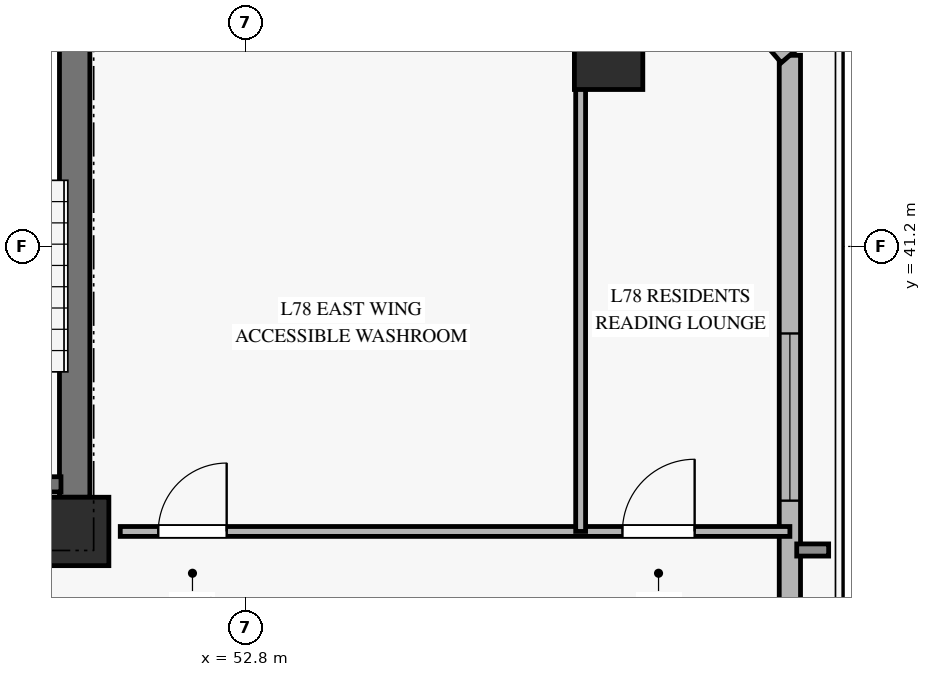
"""IFC4 building model, lengths in metres.
Left out: names, types, materials, properties, quantities, classifications, styles, units other than length and angle.
Written with IfcOpenShell. Run it as: python <this file> out.ifc"""

import sys

from ifc_helpers import new_model, si_unit, direction, frame, frame_2d, origin, origin_2d, place, context, subcontext, project, spatial, rectangle, hollow_rectangle, extrude, source, transform, mapped, element, fill, save


model = new_model("IFC4")
c1 = context("Model", 3, precision=1e-05, world=origin(), true_north=direction((0.0, 1.0)))
c2 = subcontext(c1, "Body", "Model", "MODEL_VIEW")
j1 = project(units=[si_unit("LENGTHUNIT", "METRE"), si_unit("PLANEANGLEUNIT", "RADIAN")], contexts=[c1])
p1 = place(None, origin())
s1 = spatial("IfcSite", under=j1, at=p1, CompositionType="ELEMENT")
p2 = place(p1, origin())
s2 = spatial("IfcBuilding", under=s1, at=p2, CompositionType="ELEMENT")
p3 = place(p2, frame((0.0, 0.0, 304.0)))
s3 = spatial("IfcBuildingStorey", under=s2, at=p3, CompositionType="ELEMENT", Elevation=304.0)
m1 = source(origin(), c2, "Body", "SweptSolid", [
    extrude(rectangle(XDim=0.9, YDim=0.9, at=origin_2d()), origin(), (0.0, 0.0, 1.0), 3.185),
])
p4 = place(p3, frame((50.55, 37.45, 0.0), z_axis=(0.0, 0.0, 1.0), x_axis=(1.0, 0.0, 0.0)))
e1 = element("IfcColumn", 1, at=p4, inside=s3, PredefinedType="PILASTER", context=c2, shape_type="MappedRepresentation", body=[
    mapped(m1, transform((0.0, 0.0, 0.0), x_axis=(1.0, 0.0, 0.0), y_axis=(0.0, 1.0, 0.0), z_axis=(0.0, 0.0, 1.0), scale=1.0)),
])
p5 = place(p3, frame((50.55, 37.9, 0.0), z_axis=(0.0, 0.0, 1.0), x_axis=(0.0, 1.0, 0.0)))
e2 = element("IfcWall", 2, at=p5, inside=s3, PredefinedType="SHEAR", context=c2, shape_type="SweptSolid", body=[
    extrude(rectangle(XDim=8.2, YDim=0.4, at=frame_2d((4.1, 0.0))), origin(), (0.0, 0.0, 1.0), 3.185),
])
m2 = source(origin(), c2, "Body", "SweptSolid", [
    extrude(hollow_rectangle(XDim=0.9, YDim=0.9, WallThickness=0.04, at=origin_2d()), origin(), (0.0, 0.0, 1.0), 3.185),
])
p6 = place(p3, frame((57.575, 43.715, 0.0), z_axis=(0.0, 0.0, 1.0), x_axis=(1.0, 0.0, 0.0)))
e3 = element("IfcColumn", 3, at=p6, inside=s3, PredefinedType="COLUMN", context=c2, shape_type="MappedRepresentation", body=[
    mapped(m2, transform((0.0, 0.0, 0.0), x_axis=(1.0, 0.0, 0.0), y_axis=(0.0, 1.0, 0.0), z_axis=(0.0, 0.0, 1.0), scale=1.0)),
])
p7 = place(p3, frame((59.96, 33.136, 0.0), z_axis=(0.0, 0.0, 1.0), x_axis=(0.0, 1.0, 0.0)))
e4 = element("IfcWall", 4, at=p7, inside=s3, PredefinedType="SOLIDWALL", context=c2, shape_type="SweptSolid", body=[
    extrude(rectangle(XDim=10.579, YDim=0.28, at=frame_2d((5.29, 0.0))), origin(), (0.0, 0.0, 1.0), 2.815),
])
p8 = place(p7, frame((4.719, 0.0, 0.45)))
e5 = element("IfcOpeningElement", 5, at=p8, cuts=e4, PredefinedType="OPENING", context=c2, shape_type="SweptSolid", body=[
    extrude(rectangle(XDim=2.2, YDim=2.1, at=frame_2d((1.1, 1.05))), frame((0.0, 0.15, 0.0), z_axis=(0.0, -1.0, 0.0), x_axis=(1.0, 0.0, 0.0)), (0.0, 0.0, 1.0), 0.3),
])
p9 = place(p3, frame((59.96, 43.715, 0.0), z_axis=(0.0, 0.0, 1.0), x_axis=(-0.652903544361, 0.757441061576, 0.0)))
e6 = element("IfcWall", 6, at=p9, inside=s3, PredefinedType="SOLIDWALL", context=c2, shape_type="SweptSolid", body=[
    extrude(rectangle(XDim=3.347, YDim=0.3, at=frame_2d((1.673, 0.0))), origin(), (0.0, 0.0, 1.0), 2.815),
])
p10 = place(p9, frame((0.873, 0.0, 0.45)))
e7 = element("IfcOpeningElement", 7, at=p10, cuts=e6, PredefinedType="OPENING", context=c2, shape_type="SweptSolid", body=[
    extrude(rectangle(XDim=1.6, YDim=2.0, at=frame_2d((0.8, 1.0))), frame((0.0, 0.16, 0.0), z_axis=(0.0, -1.0, 0.0), x_axis=(1.0, 0.0, 0.0)), (0.0, 0.0, 1.0), 0.32),
])
p11 = place(p3, frame((47.44, 38.07, 0.0), z_axis=(0.0, 0.0, 1.0), x_axis=(1.0, 0.0, 0.0)))
e8 = element("IfcWall", 8, at=p11, inside=s3, PredefinedType="SOLIDWALL", context=c2, shape_type="SweptSolid", body=[
    extrude(rectangle(XDim=2.93, YDim=0.2, at=frame_2d((1.465, 0.0))), origin(), (0.0, 0.0, 1.0), 3.4),
])
p12 = place(p3, frame((51.15, 37.45, 0.0), z_axis=(0.0, 0.0, 1.0), x_axis=(1.0, 0.0, 0.0)))
e9 = element("IfcWall", 9, at=p12, inside=s3, PredefinedType="PARTITIONING", context=c2, shape_type="SweptSolid", body=[
    extrude(rectangle(XDim=8.81, YDim=0.13, at=frame_2d((4.405, 0.0))), origin(), (0.0, 0.0, 1.0), 2.82),
])
p13 = place(p12, frame((0.5, 0.0, 0.0)))
e10 = element("IfcOpeningElement", 10, at=p13, cuts=e9, PredefinedType="OPENING", context=c2, shape_type="SweptSolid", body=[
    extrude(rectangle(XDim=0.9, YDim=2.1, at=frame_2d((0.45, 1.05))), frame((0.0, 0.075, 0.0), z_axis=(0.0, -1.0, 0.0), x_axis=(1.0, 0.0, 0.0)), (0.0, 0.0, 1.0), 0.15),
])
p14 = place(p12, frame((6.607, 0.0, 0.0)))
e11 = element("IfcOpeningElement", 11, at=p14, cuts=e9, PredefinedType="OPENING", context=c2, shape_type="SweptSolid", body=[
    extrude(rectangle(XDim=0.95, YDim=2.1, at=frame_2d((0.475, 1.05))), frame((0.0, 0.075, 0.0), z_axis=(0.0, -1.0, 0.0), x_axis=(1.0, 0.0, 0.0)), (0.0, 0.0, 1.0), 0.15),
])
p15 = place(p3, frame((57.207, 37.45, 0.0), z_axis=(0.0, 0.0, 1.0), x_axis=(0.0, 1.0, 0.0)))
e12 = element("IfcWall", 12, at=p15, inside=s3, PredefinedType="PARTITIONING", context=c2, shape_type="SweptSolid", body=[
    extrude(rectangle(XDim=8.8, YDim=0.13, at=frame_2d((4.4, 0.0))), origin(), (0.0, 0.0, 1.0), 2.82),
])
m3 = source(origin(), c2, "Body", "SweptSolid", [
    extrude(rectangle(XDim=2.2, YDim=2.1, at=frame_2d((1.1, 1.05))), frame((0.0, 0.03, 0.0), z_axis=(0.0, -1.0, 0.0), x_axis=(1.0, 0.0, 0.0)), (0.0, 0.0, 1.0), 0.06),
])
p16 = place(p8, origin())
e13 = element("IfcWindow", 13, at=p16, inside=s3, PartitioningType="SINGLE_PANEL", PredefinedType="WINDOW", context=c2, shape_type="MappedRepresentation", body=[
    mapped(m3, transform((0.0, 0.0, 0.0), x_axis=(1.0, 0.0, 0.0), y_axis=(0.0, 1.0, 0.0), z_axis=(0.0, 0.0, 1.0), scale=1.0)),
])
fill(e5, e13)
m4 = source(origin(), c2, "Body", "SweptSolid", [
    extrude(rectangle(XDim=0.9, YDim=2.1, at=frame_2d((0.45, 1.05))), frame((0.0, 0.025, 0.0), z_axis=(0.0, -1.0, 0.0), x_axis=(1.0, 0.0, 0.0)), (0.0, 0.0, 1.0), 0.05),
])
p17 = place(p13, origin())
e14 = element("IfcDoor", 14, at=p17, inside=s3, OperationType="SINGLE_SWING_RIGHT", PredefinedType="DOOR", context=c2, shape_type="MappedRepresentation", body=[
    mapped(m4, transform((0.0, 0.0, 0.0), x_axis=(1.0, 0.0, 0.0), y_axis=(0.0, 1.0, 0.0), z_axis=(0.0, 0.0, 1.0), scale=1.0)),
])
fill(e10, e14)
m5 = source(origin(), c2, "Body", "SweptSolid", [
    extrude(rectangle(XDim=0.95, YDim=2.1, at=frame_2d((0.475, 1.05))), frame((0.0, 0.025, 0.0), z_axis=(0.0, -1.0, 0.0), x_axis=(1.0, 0.0, 0.0)), (0.0, 0.0, 1.0), 0.05),
])
p18 = place(p14, origin())
e15 = element("IfcDoor", 15, at=p18, inside=s3, OperationType="SINGLE_SWING_RIGHT", PredefinedType="DOOR", context=c2, shape_type="MappedRepresentation", body=[
    mapped(m5, transform((0.0, 0.0, 0.0), x_axis=(1.0, 0.0, 0.0), y_axis=(0.0, 1.0, 0.0), z_axis=(0.0, 0.0, 1.0), scale=1.0)),
])
fill(e11, e15)
save(model, sys.argv[1])
